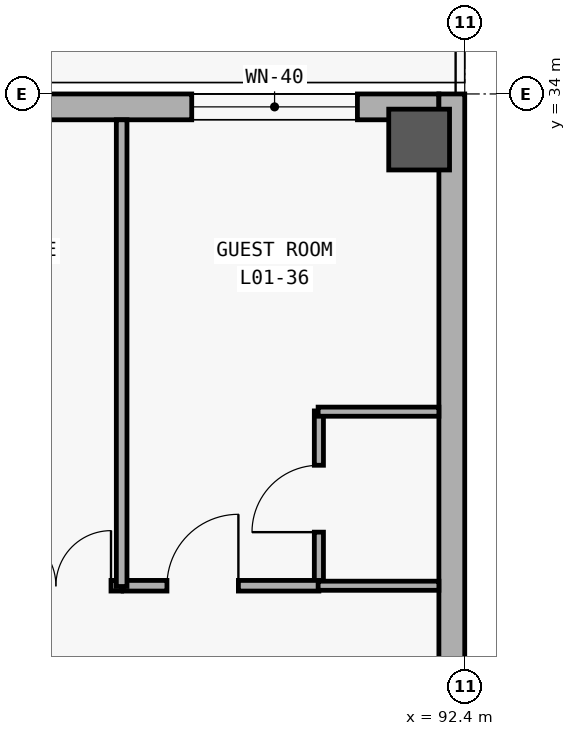
"""IFC4 building model, lengths in metres.
Left out: names, types, materials, properties, quantities, classifications, styles, units other than length and angle.
Written with IfcOpenShell. Run it as: python <this file> out.ifc"""

import sys

from ifc_helpers import new_model, si_unit, direction, frame, frame_2d, origin, origin_2d, place, context, subcontext, project, spatial, rectangle, extrude, element, fill, save


model = new_model("IFC4")
c1 = context("Model", 3, precision=1e-05, world=origin(), true_north=direction((0.0, 1.0)))
c2 = subcontext(c1, "Body", "Model", "MODEL_VIEW")
j1 = project(units=[si_unit("LENGTHUNIT", "METRE"), si_unit("PLANEANGLEUNIT", "RADIAN")], contexts=[c1])
p1 = place(None, origin())
s1 = spatial("IfcSite", under=j1, at=p1, CompositionType="ELEMENT")
p2 = place(p1, origin())
s2 = spatial("IfcBuilding", under=s1, at=p2, CompositionType="ELEMENT")
p3 = place(p2, frame((0.0, 0.0, 5.4)))
s3 = spatial("IfcBuildingStorey", under=s2, at=p3, CompositionType="ELEMENT", Elevation=5.4)
p4 = place(p3, frame((91.8, 33.4, 0.0), z_axis=(0.0, 0.0, 1.0), x_axis=(1.0, 0.0, 0.0)))
e1 = element("IfcColumn", 1, at=p4, inside=s3, PredefinedType="COLUMN", context=c2, shape_type="SweptSolid", body=[
    extrude(rectangle(XDim=0.8, YDim=0.8, at=origin_2d()), origin(), (0.0, 0.0, 1.0), 5.4),
])
p5 = place(p3, frame((8.74, 33.83, 0.0), z_axis=(0.0, 0.0, 1.0), x_axis=(1.0, 0.0, 0.0)))
e2 = element("IfcWall", 2, at=p5, inside=s3, PredefinedType="SOLIDWALL", context=c2, shape_type="SweptSolid", body=[
    extrude(rectangle(XDim=83.32, YDim=0.34, at=frame_2d((41.66, 0.0))), origin(), (0.0, 0.0, 1.0), 5.1),
])
p6 = place(p5, frame((4.795, 0.0, 0.85)))
e3 = element("IfcOpeningElement", 3, at=p6, cuts=e2, PredefinedType="OPENING", context=c2, shape_type="SweptSolid", body=[
    extrude(rectangle(XDim=1.58, YDim=1.85, at=frame_2d((0.79, 0.925))), frame((0.0, 0.18, 0.0), z_axis=(0.0, -1.0, 0.0), x_axis=(1.0, 0.0, 0.0)), (0.0, 0.0, 1.0), 0.36),
])
p7 = place(p5, frame((11.542, 0.0, 0.85)))
e4 = element("IfcOpeningElement", 4, at=p7, cuts=e2, PredefinedType="OPENING", context=c2, shape_type="SweptSolid", body=[
    extrude(rectangle(XDim=3.1, YDim=2.2, at=frame_2d((1.55, 1.1))), frame((0.0, 0.18, 0.0), z_axis=(0.0, -1.0, 0.0), x_axis=(1.0, 0.0, 0.0)), (0.0, 0.0, 1.0), 0.36),
])
p8 = place(p5, frame((16.471, 0.0, 0.85)))
e5 = element("IfcOpeningElement", 5, at=p8, cuts=e2, PredefinedType="OPENING", context=c2, shape_type="SweptSolid", body=[
    extrude(rectangle(XDim=1.25, YDim=1.45, at=frame_2d((0.625, 0.725))), frame((0.0, 0.18, 0.0), z_axis=(0.0, -1.0, 0.0), x_axis=(1.0, 0.0, 0.0)), (0.0, 0.0, 1.0), 0.36),
])
p9 = place(p5, frame((20.425, 0.0, 0.85)))
e6 = element("IfcOpeningElement", 6, at=p9, cuts=e2, PredefinedType="OPENING", context=c2, shape_type="SweptSolid", body=[
    extrude(rectangle(XDim=1.35, YDim=1.55, at=frame_2d((0.675, 0.775))), frame((0.0, 0.18, 0.0), z_axis=(0.0, -1.0, 0.0), x_axis=(1.0, 0.0, 0.0)), (0.0, 0.0, 1.0), 0.36),
])
p10 = place(p5, frame((24.379, 0.0, 0.85)))
e7 = element("IfcOpeningElement", 7, at=p10, cuts=e2, PredefinedType="OPENING", context=c2, shape_type="SweptSolid", body=[
    extrude(rectangle(XDim=1.45, YDim=1.65, at=frame_2d((0.725, 0.825))), frame((0.0, 0.18, 0.0), z_axis=(0.0, -1.0, 0.0), x_axis=(1.0, 0.0, 0.0)), (0.0, 0.0, 1.0), 0.36),
])
p11 = place(p5, frame((28.332, 0.0, 0.85)))
e8 = element("IfcOpeningElement", 8, at=p11, cuts=e2, PredefinedType="OPENING", context=c2, shape_type="SweptSolid", body=[
    extrude(rectangle(XDim=1.55, YDim=1.65, at=frame_2d((0.775, 0.825))), frame((0.0, 0.18, 0.0), z_axis=(0.0, -1.0, 0.0), x_axis=(1.0, 0.0, 0.0)), (0.0, 0.0, 1.0), 0.36),
])
p12 = place(p5, frame((32.261, 0.0, 0.85)))
e9 = element("IfcOpeningElement", 9, at=p12, cuts=e2, PredefinedType="OPENING", context=c2, shape_type="SweptSolid", body=[
    extrude(rectangle(XDim=1.7, YDim=2.0, at=frame_2d((0.85, 1.0))), frame((0.0, 0.18, 0.0), z_axis=(0.0, -1.0, 0.0), x_axis=(1.0, 0.0, 0.0)), (0.0, 0.0, 1.0), 0.36),
])
p13 = place(p5, frame((35.965, 0.0, 0.85)))
e10 = element("IfcOpeningElement", 10, at=p13, cuts=e2, PredefinedType="OPENING", context=c2, shape_type="SweptSolid", body=[
    extrude(rectangle(XDim=2.3, YDim=2.05, at=frame_2d((1.15, 1.025))), frame((0.0, 0.18, 0.0), z_axis=(0.0, -1.0, 0.0), x_axis=(1.0, 0.0, 0.0)), (0.0, 0.0, 1.0), 0.36),
])
p14 = place(p5, frame((39.744, 0.0, 0.85)))
e11 = element("IfcOpeningElement", 11, at=p14, cuts=e2, PredefinedType="OPENING", context=c2, shape_type="SweptSolid", body=[
    extrude(rectangle(XDim=2.75, YDim=2.1, at=frame_2d((1.375, 1.05))), frame((0.0, 0.18, 0.0), z_axis=(0.0, -1.0, 0.0), x_axis=(1.0, 0.0, 0.0)), (0.0, 0.0, 1.0), 0.36),
])
p15 = place(p5, frame((44.533, 0.0, 0.85)))
e12 = element("IfcOpeningElement", 12, at=p15, cuts=e2, PredefinedType="OPENING", context=c2, shape_type="SweptSolid", body=[
    extrude(rectangle(XDim=1.18, YDim=1.5, at=frame_2d((0.59, 0.75))), frame((0.0, 0.18, 0.0), z_axis=(0.0, -1.0, 0.0), x_axis=(1.0, 0.0, 0.0)), (0.0, 0.0, 1.0), 0.36),
])
p16 = place(p5, frame((48.487, 0.0, 0.85)))
e13 = element("IfcOpeningElement", 13, at=p16, cuts=e2, PredefinedType="OPENING", context=c2, shape_type="SweptSolid", body=[
    extrude(rectangle(XDim=1.28, YDim=1.6, at=frame_2d((0.64, 0.8))), frame((0.0, 0.18, 0.0), z_axis=(0.0, -1.0, 0.0), x_axis=(1.0, 0.0, 0.0)), (0.0, 0.0, 1.0), 0.36),
])
p17 = place(p5, frame((52.441, 0.0, 0.85)))
e14 = element("IfcOpeningElement", 14, at=p17, cuts=e2, PredefinedType="OPENING", context=c2, shape_type="SweptSolid", body=[
    extrude(rectangle(XDim=1.38, YDim=1.7, at=frame_2d((0.69, 0.85))), frame((0.0, 0.18, 0.0), z_axis=(0.0, -1.0, 0.0), x_axis=(1.0, 0.0, 0.0)), (0.0, 0.0, 1.0), 0.36),
])
p18 = place(p5, frame((56.395, 0.0, 0.85)))
e15 = element("IfcOpeningElement", 15, at=p18, cuts=e2, PredefinedType="OPENING", context=c2, shape_type="SweptSolid", body=[
    extrude(rectangle(XDim=1.48, YDim=1.8, at=frame_2d((0.74, 0.9))), frame((0.0, 0.18, 0.0), z_axis=(0.0, -1.0, 0.0), x_axis=(1.0, 0.0, 0.0)), (0.0, 0.0, 1.0), 0.36),
])
p19 = place(p5, frame((60.349, 0.0, 0.85)))
e16 = element("IfcOpeningElement", 16, at=p19, cuts=e2, PredefinedType="OPENING", context=c2, shape_type="SweptSolid", body=[
    extrude(rectangle(XDim=1.58, YDim=1.85, at=frame_2d((0.79, 0.925))), frame((0.0, 0.18, 0.0), z_axis=(0.0, -1.0, 0.0), x_axis=(1.0, 0.0, 0.0)), (0.0, 0.0, 1.0), 0.36),
])
p20 = place(p5, frame((64.302, 0.0, 0.85)))
e17 = element("IfcOpeningElement", 17, at=p20, cuts=e2, PredefinedType="OPENING", context=c2, shape_type="SweptSolid", body=[
    extrude(rectangle(XDim=1.68, YDim=1.9, at=frame_2d((0.84, 0.95))), frame((0.0, 0.18, 0.0), z_axis=(0.0, -1.0, 0.0), x_axis=(1.0, 0.0, 0.0)), (0.0, 0.0, 1.0), 0.36),
])
p21 = place(p5, frame((68.256, 0.0, 0.85)))
e18 = element("IfcOpeningElement", 18, at=p21, cuts=e2, PredefinedType="OPENING", context=c2, shape_type="SweptSolid", body=[
    extrude(rectangle(XDim=1.78, YDim=1.95, at=frame_2d((0.89, 0.975))), frame((0.0, 0.18, 0.0), z_axis=(0.0, -1.0, 0.0), x_axis=(1.0, 0.0, 0.0)), (0.0, 0.0, 1.0), 0.36),
])
p22 = place(p5, frame((72.21, 0.0, 0.85)))
e19 = element("IfcOpeningElement", 19, at=p22, cuts=e2, PredefinedType="OPENING", context=c2, shape_type="SweptSolid", body=[
    extrude(rectangle(XDim=1.88, YDim=1.95, at=frame_2d((0.94, 0.975))), frame((0.0, 0.18, 0.0), z_axis=(0.0, -1.0, 0.0), x_axis=(1.0, 0.0, 0.0)), (0.0, 0.0, 1.0), 0.36),
])
p23 = place(p5, frame((76.129, 0.0, 0.85)))
e20 = element("IfcOpeningElement", 20, at=p23, cuts=e2, PredefinedType="OPENING", context=c2, shape_type="SweptSolid", body=[
    extrude(rectangle(XDim=2.05, YDim=1.95, at=frame_2d((1.025, 0.975))), frame((0.0, 0.18, 0.0), z_axis=(0.0, -1.0, 0.0), x_axis=(1.0, 0.0, 0.0)), (0.0, 0.0, 1.0), 0.36),
])
p24 = place(p5, frame((80.068, 0.0, 0.85)))
e21 = element("IfcOpeningElement", 21, at=p24, cuts=e2, PredefinedType="OPENING", context=c2, shape_type="SweptSolid", body=[
    extrude(rectangle(XDim=2.18, YDim=1.95, at=frame_2d((1.09, 0.975))), frame((0.0, 0.18, 0.0), z_axis=(0.0, -1.0, 0.0), x_axis=(1.0, 0.0, 0.0)), (0.0, 0.0, 1.0), 0.36),
])
p25 = place(p3, frame((92.23, 34.0, 0.0), z_axis=(0.0, 0.0, 1.0), x_axis=(0.0, -1.0, 0.0)))
e22 = element("IfcWall", 22, at=p25, inside=s3, PredefinedType="SOLIDWALL", context=c2, shape_type="SweptSolid", body=[
    extrude(rectangle(XDim=28.0, YDim=0.34, at=frame_2d((14.0, 0.0))), origin(), (0.0, 0.0, 1.0), 5.1),
])
p26 = place(p25, frame((21.9, 0.0, 0.95)))
e23 = element("IfcOpeningElement", 23, at=p26, cuts=e22, PredefinedType="OPENING", context=c2, shape_type="SweptSolid", body=[
    extrude(rectangle(XDim=1.6, YDim=1.6, at=frame_2d((0.8, 0.8))), frame((0.0, 0.18, 0.0), z_axis=(0.0, -1.0, 0.0), x_axis=(1.0, 0.0, 0.0)), (0.0, 0.0, 1.0), 0.36),
])
p27 = place(p3, frame((90.481, 27.52, 0.0), z_axis=(0.0, 0.0, 1.0), x_axis=(0.0, 1.0, 0.0)))
e24 = element("IfcWall", 24, at=p27, inside=s3, PredefinedType="PARTITIONING", context=c2, shape_type="SweptSolid", body=[
    extrude(rectangle(XDim=2.31, YDim=0.12, at=frame_2d((1.155, 0.0))), origin(), (0.0, 0.0, 1.0), 4.18),
])
p28 = place(p27, frame((0.715, 0.0, 0.0)))
e25 = element("IfcOpeningElement", 25, at=p28, cuts=e24, PredefinedType="OPENING", context=c2, shape_type="SweptSolid", body=[
    extrude(rectangle(XDim=0.88, YDim=2.15, at=frame_2d((0.44, 1.075))), frame((0.0, 0.07, 0.0), z_axis=(0.0, -1.0, 0.0), x_axis=(1.0, 0.0, 0.0)), (0.0, 0.0, 1.0), 0.14),
])
p29 = place(p3, frame((85.311, 27.53, 0.0), z_axis=(0.0, 0.0, 1.0), x_axis=(1.0, 0.0, 0.0)))
e26 = element("IfcWall", 26, at=p29, inside=s3, PredefinedType="PARTITIONING", context=c2, shape_type="SweptSolid", body=[
    extrude(rectangle(XDim=2.575, YDim=0.14, at=frame_2d((1.288, 0.0))), origin(), (0.0, 0.0, 1.0), 4.18),
])
p30 = place(p29, frame((0.985, 0.0, 0.0)))
e27 = element("IfcOpeningElement", 27, at=p30, cuts=e26, PredefinedType="OPENING", context=c2, shape_type="SweptSolid", body=[
    extrude(rectangle(XDim=1.45, YDim=2.3, at=frame_2d((0.725, 1.15))), frame((0.0, 0.08, 0.0), z_axis=(0.0, -1.0, 0.0), x_axis=(1.0, 0.0, 0.0)), (0.0, 0.0, 1.0), 0.16),
])
p31 = place(p3, frame((87.906, 27.53, 0.0), z_axis=(0.0, 0.0, 1.0), x_axis=(1.0, 0.0, 0.0)))
e28 = element("IfcWall", 28, at=p31, inside=s3, PredefinedType="PARTITIONING", context=c2, shape_type="SweptSolid", body=[
    extrude(rectangle(XDim=2.575, YDim=0.14, at=frame_2d((1.288, 0.0))), origin(), (0.0, 0.0, 1.0), 4.18),
])
p32 = place(p31, frame((0.576, 0.0, 0.0)))
e29 = element("IfcOpeningElement", 29, at=p32, cuts=e28, PredefinedType="OPENING", context=c2, shape_type="SweptSolid", body=[
    extrude(rectangle(XDim=0.94, YDim=2.2, at=frame_2d((0.47, 1.1))), frame((0.0, 0.08, 0.0), z_axis=(0.0, -1.0, 0.0), x_axis=(1.0, 0.0, 0.0)), (0.0, 0.0, 1.0), 0.16),
])
for number, where, z_axis, x_axis in (
    (30, (90.471, 27.53, 0.0), (0.0, 0.0, 1.0), (1.0, 0.0, 0.0)),
    (31, (90.471, 29.82, 0.0), (0.0, 0.0, 1.0), (1.0, 0.0, 0.0)),
):
    element("IfcWall", number, at=place(p3, frame(where, z_axis=z_axis, x_axis=x_axis)), inside=s3, PredefinedType="PARTITIONING", context=c2, shape_type="SweptSolid", body=[
        extrude(rectangle(XDim=1.589, YDim=0.12, at=frame_2d((0.794, 0.0))), origin(), (0.0, 0.0, 1.0), 4.18),
    ])
p33 = place(p3, frame((87.886, 27.52, 0.0), z_axis=(0.0, 0.0, 1.0), x_axis=(0.0, 1.0, 0.0)))
e32 = element("IfcWall", 32, at=p33, inside=s3, PredefinedType="PARTITIONING", context=c2, shape_type="SweptSolid", body=[
    extrude(rectangle(XDim=6.14, YDim=0.14, at=frame_2d((3.07, 0.0))), origin(), (0.0, 0.0, 1.0), 4.18),
])
p34 = place(p24, origin())
e33 = element("IfcWindow", 33, at=p34, inside=s3, PartitioningType="SINGLE_PANEL", PredefinedType="WINDOW", context=c2, shape_type="SweptSolid", body=[
    extrude(rectangle(XDim=2.18, YDim=1.95, at=frame_2d((1.09, 0.975))), frame((0.0, 0.03, 0.0), z_axis=(0.0, -1.0, 0.0), x_axis=(1.0, 0.0, 0.0)), (0.0, 0.0, 1.0), 0.06),
])
fill(e21, e33)
p35 = place(p28, origin())
e34 = element("IfcDoor", 34, at=p35, inside=s3, OperationType="SINGLE_SWING_LEFT", PredefinedType="DOOR", context=c2, shape_type="SweptSolid", body=[
    extrude(rectangle(XDim=0.88, YDim=2.15, at=frame_2d((0.44, 1.075))), frame((0.0, 0.025, 0.0), z_axis=(0.0, -1.0, 0.0), x_axis=(1.0, 0.0, 0.0)), (0.0, 0.0, 1.0), 0.05),
])
fill(e25, e34)
p36 = place(p30, origin())
e35 = element("IfcDoor", 35, at=p36, inside=s3, OperationType="DOUBLE_DOOR_SINGLE_SWING", PredefinedType="DOOR", context=c2, shape_type="SweptSolid", body=[
    extrude(rectangle(XDim=1.45, YDim=2.3, at=frame_2d((0.725, 1.15))), frame((0.0, 0.025, 0.0), z_axis=(0.0, -1.0, 0.0), x_axis=(1.0, 0.0, 0.0)), (0.0, 0.0, 1.0), 0.05),
])
fill(e27, e35)
p37 = place(p32, origin())
e36 = element("IfcDoor", 36, at=p37, inside=s3, OperationType="SINGLE_SWING_RIGHT", PredefinedType="DOOR", context=c2, shape_type="SweptSolid", body=[
    extrude(rectangle(XDim=0.94, YDim=2.2, at=frame_2d((0.47, 1.1))), frame((0.0, 0.025, 0.0), z_axis=(0.0, -1.0, 0.0), x_axis=(1.0, 0.0, 0.0)), (0.0, 0.0, 1.0), 0.05),
])
fill(e29, e36)
save(model, sys.argv[1])
